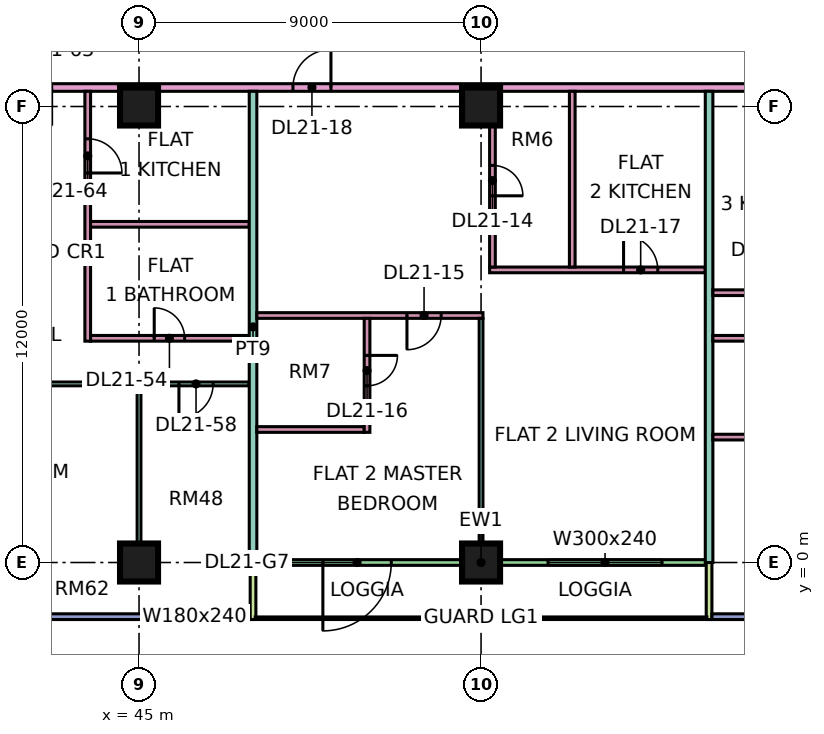
"""IFC4 building model, lengths in metres.
Left out: names, types, materials, properties, quantities, classifications, styles, units other than length and angle.
Written with IfcOpenShell. Run it as: python <this file> out.ifc"""

import sys

from ifc_helpers import new_model, si_unit, direction, frame, frame_2d, origin, origin_2d, place, context, subcontext, project, spatial, rectangle, extrude, element, fill, save


model = new_model("IFC4")
c1 = context("Model", 3, precision=1e-05, world=origin(), true_north=direction((0.0, 1.0)))
c2 = subcontext(c1, "Body", "Model", "MODEL_VIEW")
j1 = project(units=[si_unit("LENGTHUNIT", "METRE"), si_unit("PLANEANGLEUNIT", "RADIAN")], contexts=[c1])
p1 = place(None, origin())
s1 = spatial("IfcSite", under=j1, at=p1, CompositionType="ELEMENT")
p2 = place(p1, origin())
s2 = spatial("IfcBuilding", under=s1, at=p2, CompositionType="ELEMENT")
p3 = place(p2, frame((0.0, 0.0, 95.65)))
s3 = spatial("IfcBuildingStorey", under=s2, at=p3, CompositionType="ELEMENT", Elevation=95.65)
for number, where, z_axis, x_axis in (
    (1, (45.0, 0.0, 0.0), (0.0, 0.0, 1.0), (1.0, 0.0, 0.0)),
    (2, (45.0, 12.0, 0.0), (0.0, 0.0, 1.0), (1.0, 0.0, 0.0)),
    (3, (54.0, 0.0, 0.0), (0.0, 0.0, 1.0), (1.0, 0.0, 0.0)),
    (4, (54.0, 12.0, 0.0), (0.0, 0.0, 1.0), (1.0, 0.0, 0.0)),
):
    element("IfcColumn", number, at=place(p3, frame(where, z_axis=z_axis, x_axis=x_axis)), inside=s3, PredefinedType="COLUMN", context=c2, shape_type="SweptSolid", body=[
        extrude(rectangle(XDim=1.0, YDim=1.0, at=origin_2d()), origin(), (0.0, 0.0, 1.0), 3.75),
    ])
p4 = place(p3, frame((36.075, -1.425, 0.0), z_axis=(0.0, 0.0, 1.0), x_axis=(1.0, 0.0, 0.0)))
e5 = element("IfcWall", 5, at=p4, inside=s3, PredefinedType="SOLIDWALL", context=c2, shape_type="SweptSolid", body=[
    extrude(rectangle(XDim=11.85, YDim=0.15, at=frame_2d((5.925, 0.0))), origin(), (0.0, 0.0, 1.0), 3.35),
])
p5 = place(p4, frame((2.962, 0.0, 0.45)))
e6 = element("IfcOpeningElement", 6, at=p5, cuts=e5, PredefinedType="OPENING", context=c2, shape_type="SweptSolid", body=[
    extrude(rectangle(XDim=3.0, YDim=2.4, at=frame_2d((1.5, 1.2))), frame((0.0, 0.085, 0.0), z_axis=(0.0, -1.0, 0.0), x_axis=(1.0, 0.0, 0.0)), (0.0, 0.0, 1.0), 0.17),
])
p6 = place(p4, frame((9.488, 0.0, 0.45)))
e7 = element("IfcOpeningElement", 7, at=p6, cuts=e5, PredefinedType="OPENING", context=c2, shape_type="SweptSolid", body=[
    extrude(rectangle(XDim=1.8, YDim=2.4, at=frame_2d((0.9, 1.2))), frame((0.0, 0.085, 0.0), z_axis=(0.0, -1.0, 0.0), x_axis=(1.0, 0.0, 0.0)), (0.0, 0.0, 1.0), 0.17),
])
p7 = place(p3, frame((48.075, 0.0, 0.0), z_axis=(0.0, 0.0, 1.0), x_axis=(1.0, 0.0, 0.0)))
e8 = element("IfcWall", 8, at=p7, inside=s3, PredefinedType="SOLIDWALL", context=c2, shape_type="SweptSolid", body=[
    extrude(rectangle(XDim=11.85, YDim=0.15, at=frame_2d((5.925, 0.0))), origin(), (0.0, 0.0, 1.0), 3.35),
])
p8 = place(p7, frame((1.762, 0.0, 0.0)))
e9 = element("IfcOpeningElement", 9, at=p8, cuts=e8, PredefinedType="OPENING", context=c2, shape_type="SweptSolid", body=[
    extrude(rectangle(XDim=1.8, YDim=2.4, at=frame_2d((0.9, 1.2))), frame((0.0, 0.085, 0.0), z_axis=(0.0, -1.0, 0.0), x_axis=(1.0, 0.0, 0.0)), (0.0, 0.0, 1.0), 0.17),
])
p9 = place(p7, frame((7.688, 0.0, 0.45)))
e10 = element("IfcOpeningElement", 10, at=p9, cuts=e8, PredefinedType="OPENING", context=c2, shape_type="SweptSolid", body=[
    extrude(rectangle(XDim=3.0, YDim=2.4, at=frame_2d((1.5, 1.2))), frame((0.0, 0.085, 0.0), z_axis=(0.0, -1.0, 0.0), x_axis=(1.0, 0.0, 0.0)), (0.0, 0.0, 1.0), 0.17),
])
for number, where, z_axis, x_axis in (
    (11, (48.0, -1.5, 0.0), (0.0, 0.0, 1.0), (0.0, 1.0, 0.0)),
    (12, (60.0, -1.5, 0.0), (0.0, 0.0, 1.0), (0.0, 1.0, 0.0)),
):
    element("IfcWall", number, at=place(p3, frame(where, z_axis=z_axis, x_axis=x_axis)), inside=s3, PredefinedType="SOLIDWALL", context=c2, shape_type="SweptSolid", body=[
        extrude(rectangle(XDim=1.5, YDim=0.15, at=frame_2d((0.75, 0.0))), origin(), (0.0, 0.0, 1.0), 3.35),
    ])
p10 = place(p3, frame((60.075, -1.425, 0.0), z_axis=(0.0, 0.0, 1.0), x_axis=(1.0, 0.0, 0.0)))
e13 = element("IfcWall", 13, at=p10, inside=s3, PredefinedType="SOLIDWALL", context=c2, shape_type="SweptSolid", body=[
    extrude(rectangle(XDim=10.425, YDim=0.15, at=frame_2d((5.212, 0.0))), origin(), (0.0, 0.0, 1.0), 3.35),
])
p11 = place(p10, frame((1.462, 0.0, 0.45)))
e14 = element("IfcOpeningElement", 14, at=p11, cuts=e13, PredefinedType="OPENING", context=c2, shape_type="SweptSolid", body=[
    extrude(rectangle(XDim=3.0, YDim=2.4, at=frame_2d((1.5, 1.2))), frame((0.0, 0.085, 0.0), z_axis=(0.0, -1.0, 0.0), x_axis=(1.0, 0.0, 0.0)), (0.0, 0.0, 1.0), 0.17),
])
p12 = place(p10, frame((6.675, 0.0, 0.45)))
e15 = element("IfcOpeningElement", 15, at=p12, cuts=e13, PredefinedType="OPENING", context=c2, shape_type="SweptSolid", body=[
    extrude(rectangle(XDim=3.0, YDim=2.4, at=frame_2d((1.5, 1.2))), frame((0.0, 0.085, 0.0), z_axis=(0.0, -1.0, 0.0), x_axis=(1.0, 0.0, 0.0)), (0.0, 0.0, 1.0), 0.17),
])
p13 = place(p3, frame((33.05, 4.7, 0.0), z_axis=(0.0, 0.0, 1.0), x_axis=(1.0, 0.0, 0.0)))
e16 = element("IfcWall", 16, at=p13, inside=s3, PredefinedType="PARTITIONING", context=c2, shape_type="SweptSolid", body=[
    extrude(rectangle(XDim=14.85, YDim=0.1, at=frame_2d((7.425, 0.0))), origin(), (0.0, 0.0, 1.0), 3.35),
])
p14 = place(p13, frame((1.0, 0.0, 0.0)))
e17 = element("IfcOpeningElement", 17, at=p14, cuts=e16, PredefinedType="OPENING", context=c2, shape_type="SweptSolid", body=[
    extrude(rectangle(XDim=0.9, YDim=2.1, at=frame_2d((0.45, 1.05))), frame((0.0, 0.06, 0.0), z_axis=(0.0, -1.0, 0.0), x_axis=(1.0, 0.0, 0.0)), (0.0, 0.0, 1.0), 0.12),
])
p15 = place(p13, frame((13.0, 0.0, 0.0)))
e18 = element("IfcOpeningElement", 18, at=p15, cuts=e16, PredefinedType="OPENING", context=c2, shape_type="SweptSolid", body=[
    extrude(rectangle(XDim=0.9, YDim=2.1, at=frame_2d((0.45, 1.05))), frame((0.0, 0.06, 0.0), z_axis=(0.0, -1.0, 0.0), x_axis=(1.0, 0.0, 0.0)), (0.0, 0.0, 1.0), 0.12),
])
p16 = place(p13, frame((7.0, 0.0, 0.0)))
e19 = element("IfcOpeningElement", 19, at=p16, cuts=e16, PredefinedType="OPENING", context=c2, shape_type="SweptSolid", body=[
    extrude(rectangle(XDim=0.9, YDim=2.1, at=frame_2d((0.45, 1.05))), frame((0.0, 0.06, 0.0), z_axis=(0.0, -1.0, 0.0), x_axis=(1.0, 0.0, 0.0)), (0.0, 0.0, 1.0), 0.12),
])
p17 = place(p3, frame((40.65, 12.5, 0.0), z_axis=(0.0, 0.0, 1.0), x_axis=(1.0, 0.0, 0.0)))
e20 = element("IfcWall", 20, at=p17, inside=s3, PredefinedType="PARTITIONING", context=c2, shape_type="SweptSolid", body=[
    extrude(rectangle(XDim=24.825, YDim=0.2, at=frame_2d((12.413, 0.0))), origin(), (0.0, 0.0, 1.0), 3.35),
])
p18 = place(p17, frame((8.4, 0.0, 0.0)))
e21 = element("IfcOpeningElement", 21, at=p18, cuts=e20, PredefinedType="OPENING", context=c2, shape_type="SweptSolid", body=[
    extrude(rectangle(XDim=1.0, YDim=2.1, at=frame_2d((0.5, 1.05))), frame((0.0, 0.11, 0.0), z_axis=(0.0, -1.0, 0.0), x_axis=(1.0, 0.0, 0.0)), (0.0, 0.0, 1.0), 0.22),
])
p19 = place(p17, frame((1.05, 0.0, 0.0)))
e22 = element("IfcOpeningElement", 22, at=p19, cuts=e20, PredefinedType="OPENING", context=c2, shape_type="SweptSolid", body=[
    extrude(rectangle(XDim=1.0, YDim=2.1, at=frame_2d((0.5, 1.05))), frame((0.0, 0.11, 0.0), z_axis=(0.0, -1.0, 0.0), x_axis=(1.0, 0.0, 0.0)), (0.0, 0.0, 1.0), 0.22),
])
p20 = place(p3, frame((43.65, 5.825, 0.0), z_axis=(0.0, 0.0, 1.0), x_axis=(0.0, 1.0, 0.0)))
e23 = element("IfcWall", 23, at=p20, inside=s3, PredefinedType="PARTITIONING", context=c2, shape_type="SweptSolid", body=[
    extrude(rectangle(XDim=6.575, YDim=0.15, at=frame_2d((3.288, 0.0))), origin(), (0.0, 0.0, 1.0), 3.35),
])
p21 = place(p20, frame((4.425, 0.0, 0.0)))
e24 = element("IfcOpeningElement", 24, at=p21, cuts=e23, PredefinedType="OPENING", context=c2, shape_type="SweptSolid", body=[
    extrude(rectangle(XDim=0.9, YDim=2.1, at=frame_2d((0.45, 1.05))), frame((0.0, 0.085, 0.0), z_axis=(0.0, -1.0, 0.0), x_axis=(1.0, 0.0, 0.0)), (0.0, 0.0, 1.0), 0.17),
])
p22 = place(p3, frame((43.725, 5.9, 0.0), z_axis=(0.0, 0.0, 1.0), x_axis=(1.0, 0.0, 0.0)))
e25 = element("IfcWall", 25, at=p22, inside=s3, PredefinedType="PARTITIONING", context=c2, shape_type="SweptSolid", body=[
    extrude(rectangle(XDim=4.175, YDim=0.15, at=frame_2d((2.087, 0.0))), origin(), (0.0, 0.0, 1.0), 3.35),
])
p23 = place(p22, frame((1.675, 0.0, 0.0)))
e26 = element("IfcOpeningElement", 26, at=p23, cuts=e25, PredefinedType="OPENING", context=c2, shape_type="SweptSolid", body=[
    extrude(rectangle(XDim=0.8, YDim=2.1, at=frame_2d((0.4, 1.05))), frame((0.0, 0.085, 0.0), z_axis=(0.0, -1.0, 0.0), x_axis=(1.0, 0.0, 0.0)), (0.0, 0.0, 1.0), 0.17),
])
p24 = place(p3, frame((43.725, 8.9, 0.0), z_axis=(0.0, 0.0, 1.0), x_axis=(1.0, 0.0, 0.0)))
e27 = element("IfcWall", 27, at=p24, inside=s3, PredefinedType="PARTITIONING", context=c2, shape_type="SweptSolid", body=[
    extrude(rectangle(XDim=4.175, YDim=0.15, at=frame_2d((2.087, 0.0))), origin(), (0.0, 0.0, 1.0), 3.35),
])
p25 = place(p3, frame((45.0, 0.0, 0.0), z_axis=(0.0, 0.0, 1.0), x_axis=(0.0, 1.0, 0.0)))
e28 = element("IfcWall", 28, at=p25, inside=s3, PredefinedType="PARTITIONING", context=c2, shape_type="SweptSolid", body=[
    extrude(rectangle(XDim=4.65, YDim=0.1, at=frame_2d((2.325, 0.0))), origin(), (0.0, 0.0, 1.0), 3.35),
])
p26 = place(p3, frame((48.0, 0.0, 0.0), z_axis=(0.0, 0.0, 1.0), x_axis=(0.0, 1.0, 0.0)))
e29 = element("IfcWall", 29, at=p26, inside=s3, PredefinedType="PARTITIONING", context=c2, shape_type="SweptSolid", body=[
    extrude(rectangle(XDim=12.4, YDim=0.2, at=frame_2d((6.2, 0.0))), origin(), (0.0, 0.0, 1.0), 3.35),
])
p27 = place(p3, frame((48.1, 3.5, 0.0), z_axis=(0.0, 0.0, 1.0), x_axis=(1.0, 0.0, 0.0)))
e30 = element("IfcWall", 30, at=p27, inside=s3, PredefinedType="PARTITIONING", context=c2, shape_type="SweptSolid", body=[
    extrude(rectangle(XDim=2.825, YDim=0.15, at=frame_2d((1.413, 0.0))), origin(), (0.0, 0.0, 1.0), 3.35),
])
p28 = place(p3, frame((48.1, 6.5, 0.0), z_axis=(0.0, 0.0, 1.0), x_axis=(1.0, 0.0, 0.0)))
e31 = element("IfcWall", 31, at=p28, inside=s3, PredefinedType="PARTITIONING", context=c2, shape_type="SweptSolid", body=[
    extrude(rectangle(XDim=5.95, YDim=0.15, at=frame_2d((2.975, 0.0))), origin(), (0.0, 0.0, 1.0), 3.35),
])
p29 = place(p28, frame((3.95, 0.0, 0.0)))
e32 = element("IfcOpeningElement", 32, at=p29, cuts=e31, PredefinedType="OPENING", context=c2, shape_type="SweptSolid", body=[
    extrude(rectangle(XDim=0.9, YDim=2.1, at=frame_2d((0.45, 1.05))), frame((0.0, 0.085, 0.0), z_axis=(0.0, -1.0, 0.0), x_axis=(1.0, 0.0, 0.0)), (0.0, 0.0, 1.0), 0.17),
])
p30 = place(p3, frame((51.0, 3.425, 0.0), z_axis=(0.0, 0.0, 1.0), x_axis=(0.0, 1.0, 0.0)))
e33 = element("IfcWall", 33, at=p30, inside=s3, PredefinedType="PARTITIONING", context=c2, shape_type="SweptSolid", body=[
    extrude(rectangle(XDim=3.0, YDim=0.15, at=frame_2d((1.5, 0.0))), origin(), (0.0, 0.0, 1.0), 3.35),
])
p31 = place(p30, frame((1.225, 0.0, 0.0)))
e34 = element("IfcOpeningElement", 34, at=p31, cuts=e33, PredefinedType="OPENING", context=c2, shape_type="SweptSolid", body=[
    extrude(rectangle(XDim=0.8, YDim=2.1, at=frame_2d((0.4, 1.05))), frame((0.0, 0.085, 0.0), z_axis=(0.0, -1.0, 0.0), x_axis=(1.0, 0.0, 0.0)), (0.0, 0.0, 1.0), 0.17),
])
p32 = place(p3, frame((54.0, 0.074, 0.0), z_axis=(0.0, 0.0, 1.0), x_axis=(0.0, 1.0, 0.0)))
e35 = element("IfcWall", 35, at=p32, inside=s3, PredefinedType="PARTITIONING", context=c2, shape_type="SweptSolid", body=[
    extrude(rectangle(XDim=6.351, YDim=0.1, at=frame_2d((3.176, 0.0))), origin(), (0.0, 0.0, 1.0), 3.35),
])
p33 = place(p3, frame((54.225, 7.7, 0.0), z_axis=(0.0, 0.0, 1.0), x_axis=(1.0, 0.0, 0.0)))
e36 = element("IfcWall", 36, at=p33, inside=s3, PredefinedType="PARTITIONING", context=c2, shape_type="SweptSolid", body=[
    extrude(rectangle(XDim=5.675, YDim=0.15, at=frame_2d((2.837, 0.0))), origin(), (0.0, 0.0, 1.0), 3.35),
])
p34 = place(p33, frame((3.525, 0.0, 0.0)))
e37 = element("IfcOpeningElement", 37, at=p34, cuts=e36, PredefinedType="OPENING", context=c2, shape_type="SweptSolid", body=[
    extrude(rectangle(XDim=0.9, YDim=2.1, at=frame_2d((0.45, 1.05))), frame((0.0, 0.085, 0.0), z_axis=(0.0, -1.0, 0.0), x_axis=(1.0, 0.0, 0.0)), (0.0, 0.0, 1.0), 0.17),
])
p35 = place(p3, frame((54.3, 7.775, 0.0), z_axis=(0.0, 0.0, 1.0), x_axis=(0.0, 1.0, 0.0)))
e38 = element("IfcWall", 38, at=p35, inside=s3, PredefinedType="PARTITIONING", context=c2, shape_type="SweptSolid", body=[
    extrude(rectangle(XDim=4.625, YDim=0.15, at=frame_2d((2.312, 0.0))), origin(), (0.0, 0.0, 1.0), 3.35),
])
p36 = place(p35, frame((1.875, 0.0, 0.0)))
e39 = element("IfcOpeningElement", 39, at=p36, cuts=e38, PredefinedType="OPENING", context=c2, shape_type="SweptSolid", body=[
    extrude(rectangle(XDim=0.8, YDim=2.1, at=frame_2d((0.4, 1.05))), frame((0.0, 0.085, 0.0), z_axis=(0.0, -1.0, 0.0), x_axis=(1.0, 0.0, 0.0)), (0.0, 0.0, 1.0), 0.17),
])
p37 = place(p3, frame((56.4, 7.775, 0.0), z_axis=(0.0, 0.0, 1.0), x_axis=(0.0, 1.0, 0.0)))
e40 = element("IfcWall", 40, at=p37, inside=s3, PredefinedType="PARTITIONING", context=c2, shape_type="SweptSolid", body=[
    extrude(rectangle(XDim=4.625, YDim=0.15, at=frame_2d((2.312, 0.0))), origin(), (0.0, 0.0, 1.0), 3.35),
])
p38 = place(p3, frame((60.0, 0.0, 0.0), z_axis=(0.0, 0.0, 1.0), x_axis=(0.0, 1.0, 0.0)))
e41 = element("IfcWall", 41, at=p38, inside=s3, PredefinedType="PARTITIONING", context=c2, shape_type="SweptSolid", body=[
    extrude(rectangle(XDim=12.4, YDim=0.2, at=frame_2d((6.2, 0.0))), origin(), (0.0, 0.0, 1.0), 3.35),
])
p39 = place(p3, frame((60.1, 3.3, 0.0), z_axis=(0.0, 0.0, 1.0), x_axis=(1.0, 0.0, 0.0)))
e42 = element("IfcWall", 42, at=p39, inside=s3, PredefinedType="PARTITIONING", context=c2, shape_type="SweptSolid", body=[
    extrude(rectangle(XDim=2.975, YDim=0.15, at=frame_2d((1.487, 0.0))), origin(), (0.0, 0.0, 1.0), 3.35),
])
p40 = place(p3, frame((60.1, 5.9, 0.0), z_axis=(0.0, 0.0, 1.0), x_axis=(1.0, 0.0, 0.0)))
e43 = element("IfcWall", 43, at=p40, inside=s3, PredefinedType="PARTITIONING", context=c2, shape_type="SweptSolid", body=[
    extrude(rectangle(XDim=5.95, YDim=0.15, at=frame_2d((2.975, 0.0))), origin(), (0.0, 0.0, 1.0), 3.35),
])
p41 = place(p40, frame((3.95, 0.0, 0.0)))
e44 = element("IfcOpeningElement", 44, at=p41, cuts=e43, PredefinedType="OPENING", context=c2, shape_type="SweptSolid", body=[
    extrude(rectangle(XDim=0.9, YDim=2.1, at=frame_2d((0.45, 1.05))), frame((0.0, 0.085, 0.0), z_axis=(0.0, -1.0, 0.0), x_axis=(1.0, 0.0, 0.0)), (0.0, 0.0, 1.0), 0.17),
])
p42 = place(p3, frame((60.1, 7.1, 0.0), z_axis=(0.0, 0.0, 1.0), x_axis=(1.0, 0.0, 0.0)))
e45 = element("IfcWall", 45, at=p42, inside=s3, PredefinedType="PARTITIONING", context=c2, shape_type="SweptSolid", body=[
    extrude(rectangle(XDim=5.375, YDim=0.15, at=frame_2d((2.688, 0.0))), origin(), (0.0, 0.0, 1.0), 3.35),
])
p43 = place(p42, frame((3.8, 0.0, 0.0)))
e46 = element("IfcOpeningElement", 46, at=p43, cuts=e45, PredefinedType="OPENING", context=c2, shape_type="SweptSolid", body=[
    extrude(rectangle(XDim=0.8, YDim=2.1, at=frame_2d((0.4, 1.05))), frame((0.0, 0.085, 0.0), z_axis=(0.0, -1.0, 0.0), x_axis=(1.0, 0.0, 0.0)), (0.0, 0.0, 1.0), 0.17),
])
p44 = place(p42, frame((1.1, 0.0, 0.0)))
e47 = element("IfcOpeningElement", 47, at=p44, cuts=e45, PredefinedType="OPENING", context=c2, shape_type="SweptSolid", body=[
    extrude(rectangle(XDim=0.9, YDim=2.1, at=frame_2d((0.45, 1.05))), frame((0.0, 0.085, 0.0), z_axis=(0.0, -1.0, 0.0), x_axis=(1.0, 0.0, 0.0)), (0.0, 0.0, 1.0), 0.17),
])
p45 = place(p6, origin())
e48 = element("IfcWindow", 48, at=p45, inside=s3, PartitioningType="SINGLE_PANEL", PredefinedType="WINDOW", context=c2, shape_type="SweptSolid", body=[
    extrude(rectangle(XDim=1.8, YDim=2.4, at=frame_2d((0.9, 1.2))), frame((0.0, 0.03, 0.0), z_axis=(0.0, -1.0, 0.0), x_axis=(1.0, 0.0, 0.0)), (0.0, 0.0, 1.0), 0.06),
])
fill(e7, e48)
p46 = place(p8, frame((1.8, 0.0, 0.0), z_axis=(0.0, 0.0, 1.0), x_axis=(-1.0, 0.0, 0.0)))
e49 = element("IfcDoor", 49, at=p46, inside=s3, OperationType="DOUBLE_DOOR_SINGLE_SWING", PredefinedType="DOOR", context=c2, shape_type="SweptSolid", body=[
    extrude(rectangle(XDim=1.8, YDim=2.4, at=frame_2d((0.9, 1.2))), frame((0.0, 0.025, 0.0), z_axis=(0.0, -1.0, 0.0), x_axis=(1.0, 0.0, 0.0)), (0.0, 0.0, 1.0), 0.05),
])
fill(e9, e49)
p47 = place(p9, origin())
e50 = element("IfcWindow", 50, at=p47, inside=s3, PartitioningType="SINGLE_PANEL", PredefinedType="WINDOW", context=c2, shape_type="SweptSolid", body=[
    extrude(rectangle(XDim=3.0, YDim=2.4, at=frame_2d((1.5, 1.2))), frame((0.0, 0.03, 0.0), z_axis=(0.0, -1.0, 0.0), x_axis=(1.0, 0.0, 0.0)), (0.0, 0.0, 1.0), 0.06),
])
fill(e10, e50)
p48 = place(p36, frame((0.8, 0.0, 0.0), z_axis=(0.0, 0.0, 1.0), x_axis=(-1.0, 0.0, 0.0)))
e51 = element("IfcDoor", 51, at=p48, inside=s3, OperationType="SINGLE_SWING_LEFT", PredefinedType="DOOR", context=c2, shape_type="SweptSolid", body=[
    extrude(rectangle(XDim=0.8, YDim=2.1, at=frame_2d((0.4, 1.05))), frame((0.0, 0.025, 0.0), z_axis=(0.0, -1.0, 0.0), x_axis=(1.0, 0.0, 0.0)), (0.0, 0.0, 1.0), 0.05),
])
fill(e39, e51)
p49 = place(p29, frame((0.9, 0.0, 0.0), z_axis=(0.0, 0.0, 1.0), x_axis=(-1.0, 0.0, 0.0)))
e52 = element("IfcDoor", 52, at=p49, inside=s3, OperationType="SINGLE_SWING_LEFT", PredefinedType="DOOR", context=c2, shape_type="SweptSolid", body=[
    extrude(rectangle(XDim=0.9, YDim=2.1, at=frame_2d((0.45, 1.05))), frame((0.0, 0.025, 0.0), z_axis=(0.0, -1.0, 0.0), x_axis=(1.0, 0.0, 0.0)), (0.0, 0.0, 1.0), 0.05),
])
fill(e32, e52)
p50 = place(p31, origin())
e53 = element("IfcDoor", 53, at=p50, inside=s3, OperationType="SINGLE_SWING_RIGHT", PredefinedType="DOOR", context=c2, shape_type="SweptSolid", body=[
    extrude(rectangle(XDim=0.8, YDim=2.1, at=frame_2d((0.4, 1.05))), frame((0.0, 0.025, 0.0), z_axis=(0.0, -1.0, 0.0), x_axis=(1.0, 0.0, 0.0)), (0.0, 0.0, 1.0), 0.05),
])
fill(e34, e53)
p51 = place(p34, origin())
e54 = element("IfcDoor", 54, at=p51, inside=s3, OperationType="SINGLE_SWING_LEFT", PredefinedType="DOOR", context=c2, shape_type="SweptSolid", body=[
    extrude(rectangle(XDim=0.9, YDim=2.1, at=frame_2d((0.45, 1.05))), frame((0.0, 0.025, 0.0), z_axis=(0.0, -1.0, 0.0), x_axis=(1.0, 0.0, 0.0)), (0.0, 0.0, 1.0), 0.05),
])
fill(e37, e54)
p52 = place(p18, frame((1.0, 0.0, 0.0), z_axis=(0.0, 0.0, 1.0), x_axis=(-1.0, 0.0, 0.0)))
e55 = element("IfcDoor", 55, at=p52, inside=s3, OperationType="SINGLE_SWING_RIGHT", PredefinedType="DOOR", context=c2, shape_type="SweptSolid", body=[
    extrude(rectangle(XDim=1.0, YDim=2.1, at=frame_2d((0.5, 1.05))), frame((0.0, 0.025, 0.0), z_axis=(0.0, -1.0, 0.0), x_axis=(1.0, 0.0, 0.0)), (0.0, 0.0, 1.0), 0.05),
])
fill(e21, e55)
p53 = place(p23, origin())
e56 = element("IfcDoor", 56, at=p53, inside=s3, OperationType="SINGLE_SWING_LEFT", PredefinedType="DOOR", context=c2, shape_type="SweptSolid", body=[
    extrude(rectangle(XDim=0.8, YDim=2.1, at=frame_2d((0.4, 1.05))), frame((0.0, 0.025, 0.0), z_axis=(0.0, -1.0, 0.0), x_axis=(1.0, 0.0, 0.0)), (0.0, 0.0, 1.0), 0.05),
])
fill(e26, e56)
p54 = place(p15, frame((0.9, 0.0, 0.0), z_axis=(0.0, 0.0, 1.0), x_axis=(-1.0, 0.0, 0.0)))
e57 = element("IfcDoor", 57, at=p54, inside=s3, OperationType="SINGLE_SWING_LEFT", PredefinedType="DOOR", context=c2, shape_type="SweptSolid", body=[
    extrude(rectangle(XDim=0.9, YDim=2.1, at=frame_2d((0.45, 1.05))), frame((0.0, 0.025, 0.0), z_axis=(0.0, -1.0, 0.0), x_axis=(1.0, 0.0, 0.0)), (0.0, 0.0, 1.0), 0.05),
])
fill(e18, e57)
p55 = place(p21, frame((0.9, 0.0, 0.0), z_axis=(0.0, 0.0, 1.0), x_axis=(-1.0, 0.0, 0.0)))
e58 = element("IfcDoor", 58, at=p55, inside=s3, OperationType="SINGLE_SWING_LEFT", PredefinedType="DOOR", context=c2, shape_type="SweptSolid", body=[
    extrude(rectangle(XDim=0.9, YDim=2.1, at=frame_2d((0.45, 1.05))), frame((0.0, 0.025, 0.0), z_axis=(0.0, -1.0, 0.0), x_axis=(1.0, 0.0, 0.0)), (0.0, 0.0, 1.0), 0.05),
])
fill(e24, e58)
save(model, sys.argv[1])
